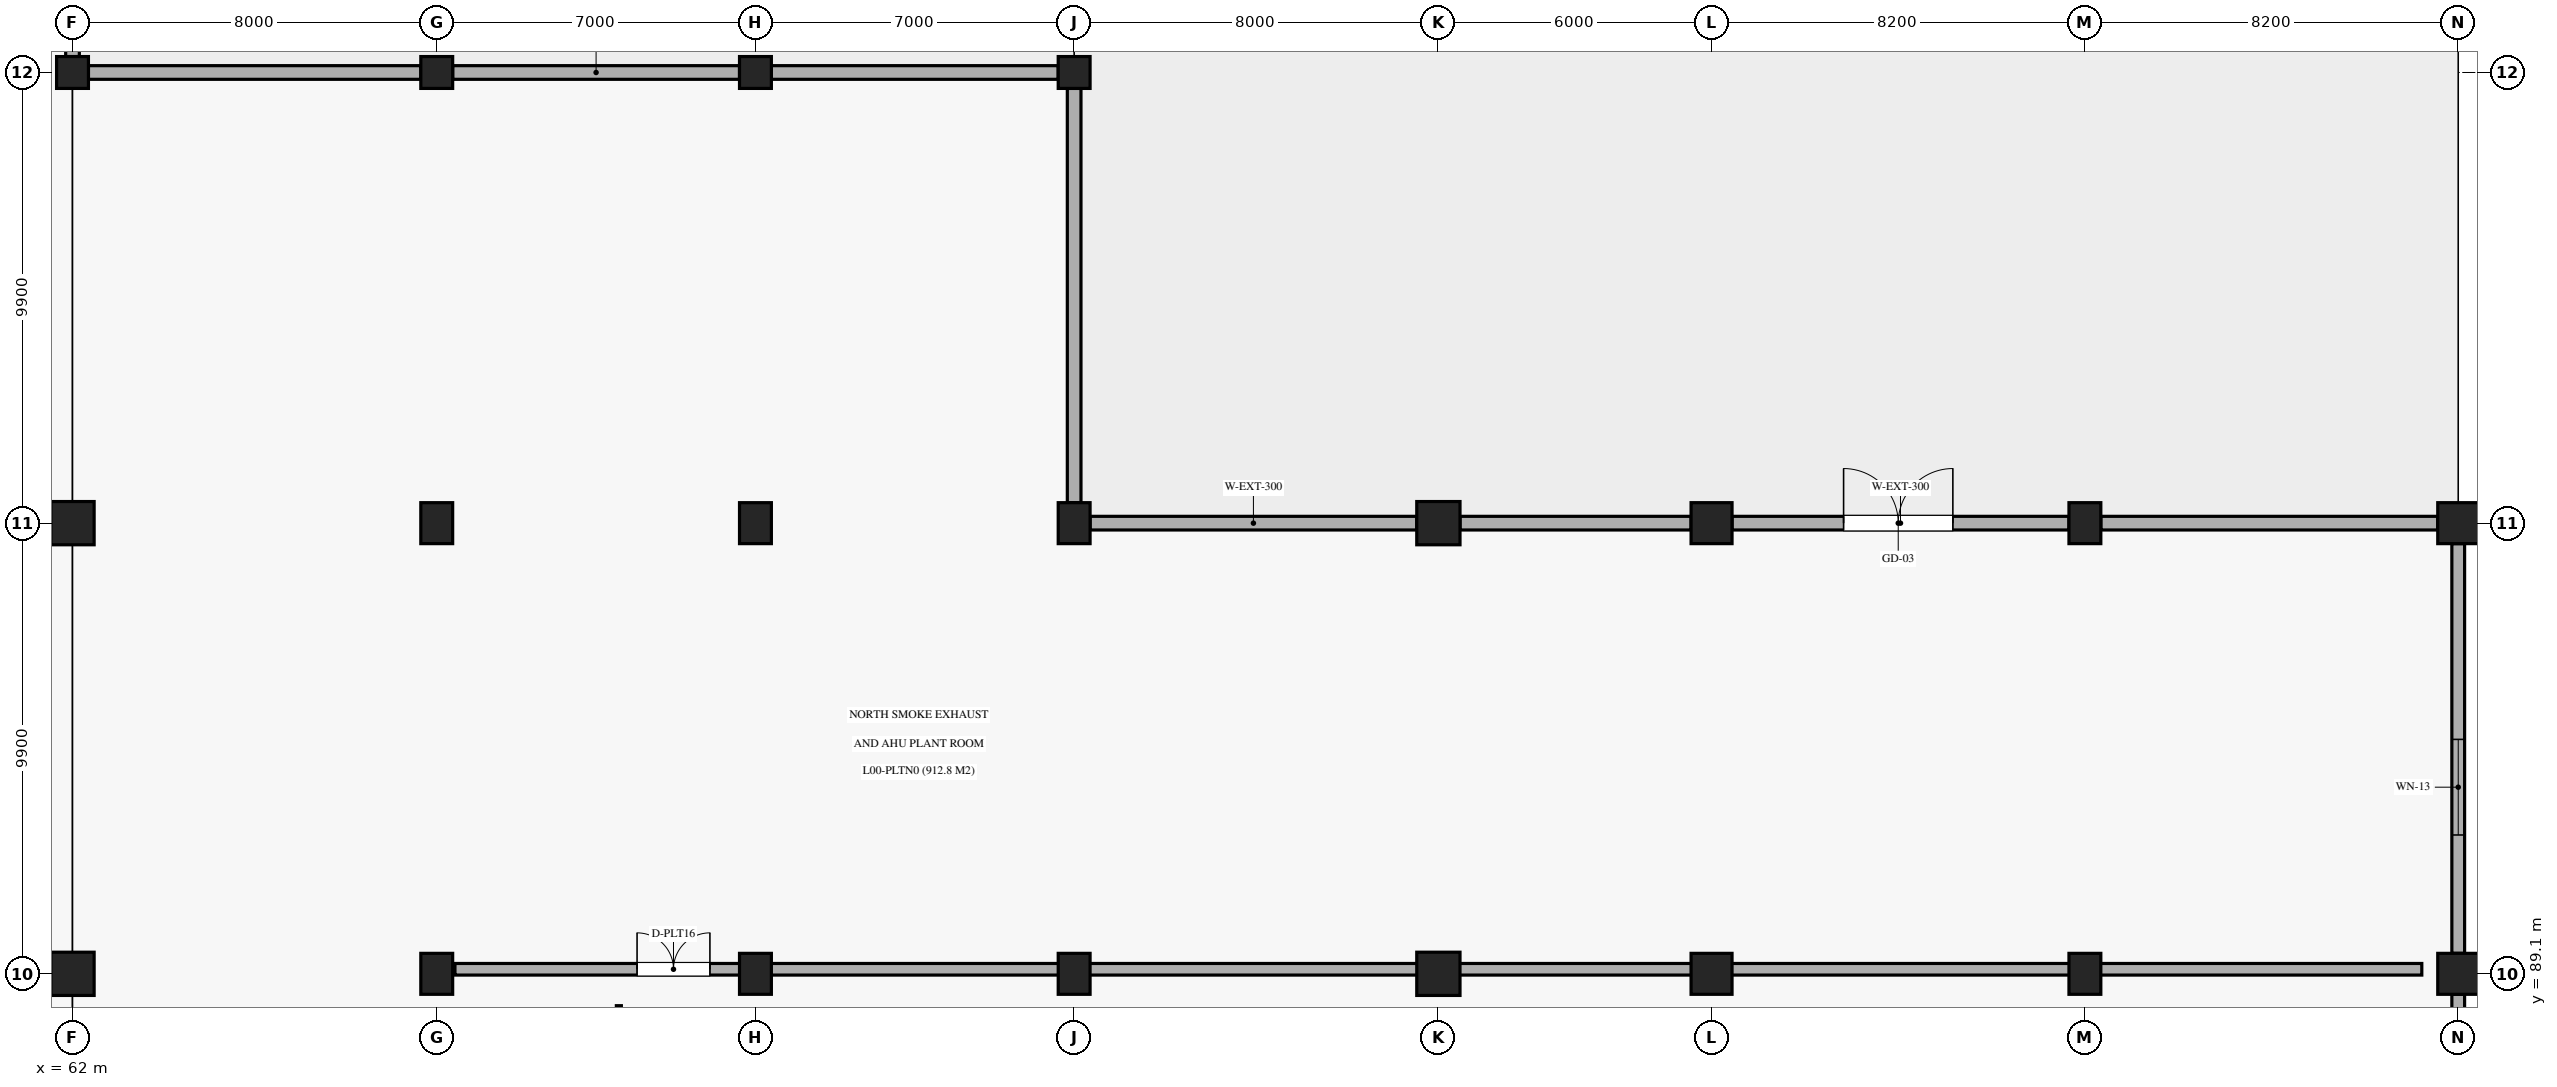
"""IFC4 building model, lengths in metres.
Left out: names, types, materials, properties, quantities, classifications, styles, units other than length and angle.
Written with IfcOpenShell. Run it as: python <this file> out.ifc"""

import sys

from ifc_helpers import new_model, si_unit, direction, frame, frame_2d, origin, origin_2d, place, context, subcontext, project, spatial, rectangle, extrude, element, fill, save


model = new_model("IFC4")
c1 = context("Model", 3, precision=1e-05, world=origin(), true_north=direction((0.0, 1.0)))
c2 = subcontext(c1, "Body", "Model", "MODEL_VIEW")
j1 = project(units=[si_unit("LENGTHUNIT", "METRE"), si_unit("PLANEANGLEUNIT", "RADIAN")], contexts=[c1])
p1 = place(None, origin())
s1 = spatial("IfcSite", under=j1, at=p1, CompositionType="ELEMENT")
p2 = place(p1, origin())
s2 = spatial("IfcBuilding", under=s1, at=p2, CompositionType="ELEMENT")
p3 = place(p2, origin())
s3 = spatial("IfcBuildingStorey", under=s2, at=p3, CompositionType="ELEMENT", Elevation=0.0)
for number, where, z_axis, x_axis in (
    (1, (62.0, 89.1, 0.0), (0.0, 0.0, 1.0), (1.0, 0.0, 0.0)),
    (2, (62.0, 99.0, 0.0), (0.0, 0.0, 1.0), (1.0, 0.0, 0.0)),
):
    element("IfcColumn", number, at=place(p3, frame(where, z_axis=z_axis, x_axis=x_axis)), inside=s3, PredefinedType="COLUMN", context=c2, shape_type="SweptSolid", body=[
        extrude(rectangle(XDim=0.95, YDim=0.95, at=origin_2d()), origin(), (0.0, 0.0, 1.0), 5.44),
    ])
p4 = place(p3, frame((62.0, 108.9, 0.0), z_axis=(0.0, 0.0, 1.0), x_axis=(1.0, 0.0, 0.0)))
e3 = element("IfcColumn", 3, at=p4, inside=s3, PredefinedType="COLUMN", context=c2, shape_type="SweptSolid", body=[
    extrude(rectangle(XDim=0.7, YDim=0.7, at=origin_2d()), origin(), (0.0, 0.0, 1.0), 5.44),
])
for number, where, z_axis, x_axis in (
    (4, (70.0, 89.1, 0.0), (0.0, 0.0, 1.0), (1.0, 0.0, 0.0)),
    (5, (70.0, 99.0, 0.0), (0.0, 0.0, 1.0), (1.0, 0.0, 0.0)),
):
    element("IfcColumn", number, at=place(p3, frame(where, z_axis=z_axis, x_axis=x_axis)), inside=s3, PredefinedType="COLUMN", context=c2, shape_type="SweptSolid", body=[
        extrude(rectangle(XDim=0.7, YDim=0.9, at=origin_2d()), origin(), (0.0, 0.0, 1.0), 5.44),
    ])
p5 = place(p3, frame((70.0, 108.9, 0.0), z_axis=(0.0, 0.0, 1.0), x_axis=(1.0, 0.0, 0.0)))
e6 = element("IfcColumn", 6, at=p5, inside=s3, PredefinedType="COLUMN", context=c2, shape_type="SweptSolid", body=[
    extrude(rectangle(XDim=0.7, YDim=0.7, at=origin_2d()), origin(), (0.0, 0.0, 1.0), 5.44),
])
for number, where, z_axis, x_axis in (
    (7, (77.0, 89.1, 0.0), (0.0, 0.0, 1.0), (1.0, 0.0, 0.0)),
    (8, (77.0, 99.0, 0.0), (0.0, 0.0, 1.0), (1.0, 0.0, 0.0)),
):
    element("IfcColumn", number, at=place(p3, frame(where, z_axis=z_axis, x_axis=x_axis)), inside=s3, PredefinedType="COLUMN", context=c2, shape_type="SweptSolid", body=[
        extrude(rectangle(XDim=0.7, YDim=0.9, at=origin_2d()), origin(), (0.0, 0.0, 1.0), 5.44),
    ])
p6 = place(p3, frame((77.0, 108.9, 0.0), z_axis=(0.0, 0.0, 1.0), x_axis=(1.0, 0.0, 0.0)))
e9 = element("IfcColumn", 9, at=p6, inside=s3, PredefinedType="COLUMN", context=c2, shape_type="SweptSolid", body=[
    extrude(rectangle(XDim=0.7, YDim=0.7, at=origin_2d()), origin(), (0.0, 0.0, 1.0), 5.44),
])
for number, where, z_axis, x_axis in (
    (10, (84.0, 89.1, 0.0), (0.0, 0.0, 1.0), (1.0, 0.0, 0.0)),
    (11, (84.0, 99.0, 0.0), (0.0, 0.0, 1.0), (1.0, 0.0, 0.0)),
):
    element("IfcColumn", number, at=place(p3, frame(where, z_axis=z_axis, x_axis=x_axis)), inside=s3, PredefinedType="COLUMN", context=c2, shape_type="SweptSolid", body=[
        extrude(rectangle(XDim=0.7, YDim=0.9, at=origin_2d()), origin(), (0.0, 0.0, 1.0), 5.44),
    ])
p7 = place(p3, frame((84.0, 108.9, 0.0), z_axis=(0.0, 0.0, 1.0), x_axis=(1.0, 0.0, 0.0)))
e12 = element("IfcColumn", 12, at=p7, inside=s3, PredefinedType="COLUMN", context=c2, shape_type="SweptSolid", body=[
    extrude(rectangle(XDim=0.7, YDim=0.7, at=origin_2d()), origin(), (0.0, 0.0, 1.0), 5.44),
])
for number, where, z_axis, x_axis in (
    (13, (92.0, 89.1, 0.0), (0.0, 0.0, 1.0), (1.0, 0.0, 0.0)),
    (14, (92.0, 99.0, 0.0), (0.0, 0.0, 1.0), (1.0, 0.0, 0.0)),
):
    element("IfcColumn", number, at=place(p3, frame(where, z_axis=z_axis, x_axis=x_axis)), inside=s3, PredefinedType="COLUMN", context=c2, shape_type="SweptSolid", body=[
        extrude(rectangle(XDim=0.95, YDim=0.95, at=origin_2d()), origin(), (0.0, 0.0, 1.0), 5.44),
    ])
for number, where, z_axis, x_axis in (
    (15, (98.0, 89.1, 0.0), (0.0, 0.0, 1.0), (1.0, 0.0, 0.0)),
    (16, (98.0, 99.0, 0.0), (0.0, 0.0, 1.0), (1.0, 0.0, 0.0)),
):
    element("IfcColumn", number, at=place(p3, frame(where, z_axis=z_axis, x_axis=x_axis)), inside=s3, PredefinedType="COLUMN", context=c2, shape_type="SweptSolid", body=[
        extrude(rectangle(XDim=0.9, YDim=0.9, at=origin_2d()), origin(), (0.0, 0.0, 1.0), 5.44),
    ])
for number, where, z_axis, x_axis in (
    (17, (106.2, 89.1, 0.0), (0.0, 0.0, 1.0), (1.0, 0.0, 0.0)),
    (18, (106.2, 99.0, 0.0), (0.0, 0.0, 1.0), (1.0, 0.0, 0.0)),
):
    element("IfcColumn", number, at=place(p3, frame(where, z_axis=z_axis, x_axis=x_axis)), inside=s3, PredefinedType="COLUMN", context=c2, shape_type="SweptSolid", body=[
        extrude(rectangle(XDim=0.7, YDim=0.9, at=origin_2d()), origin(), (0.0, 0.0, 1.0), 5.44),
    ])
for number, where, z_axis, x_axis in (
    (19, (114.4, 89.1, 0.0), (0.0, 0.0, 1.0), (1.0, 0.0, 0.0)),
    (20, (114.4, 99.0, 0.0), (0.0, 0.0, 1.0), (1.0, 0.0, 0.0)),
):
    element("IfcColumn", number, at=place(p3, frame(where, z_axis=z_axis, x_axis=x_axis)), inside=s3, PredefinedType="COLUMN", context=c2, shape_type="SweptSolid", body=[
        extrude(rectangle(XDim=0.9, YDim=0.9, at=origin_2d()), origin(), (0.0, 0.0, 1.0), 5.44),
    ])
p8 = place(p3, frame((114.4, 79.65, 0.0), z_axis=(0.0, 0.0, 1.0), x_axis=(0.0, 1.0, 0.0)))
e21 = element("IfcWall", 21, at=p8, inside=s3, PredefinedType="SOLIDWALL", context=c2, shape_type="SweptSolid", body=[
    extrude(rectangle(XDim=9.0, YDim=0.28, at=frame_2d((4.5, 0.0))), origin(), (0.0, 0.0, 1.0), 4.4),
])
p9 = place(p8, frame((2.6, 0.0, 1.05)))
e22 = element("IfcOpeningElement", 22, at=p9, cuts=e21, PredefinedType="OPENING", context=c2, shape_type="SweptSolid", body=[
    extrude(rectangle(XDim=2.3, YDim=1.55, at=frame_2d((1.15, 0.775))), frame((0.0, 0.15, 0.0), z_axis=(0.0, -1.0, 0.0), x_axis=(1.0, 0.0, 0.0)), (0.0, 0.0, 1.0), 0.3),
])
p10 = place(p3, frame((114.4, 89.55, 0.0), z_axis=(0.0, 0.0, 1.0), x_axis=(0.0, 1.0, 0.0)))
e23 = element("IfcWall", 23, at=p10, inside=s3, PredefinedType="SOLIDWALL", context=c2, shape_type="SweptSolid", body=[
    extrude(rectangle(XDim=9.0, YDim=0.28, at=frame_2d((4.5, 0.0))), origin(), (0.0, 0.0, 1.0), 4.4),
])
p11 = place(p10, frame((2.6, 0.0, 1.05)))
e24 = element("IfcOpeningElement", 24, at=p11, cuts=e23, PredefinedType="OPENING", context=c2, shape_type="SweptSolid", body=[
    extrude(rectangle(XDim=2.1, YDim=1.5, at=frame_2d((1.05, 0.75))), frame((0.0, 0.15, 0.0), z_axis=(0.0, -1.0, 0.0), x_axis=(1.0, 0.0, 0.0)), (0.0, 0.0, 1.0), 0.3),
])
p12 = place(p3, frame((84.35, 99.0, 0.0), z_axis=(0.0, 0.0, 1.0), x_axis=(1.0, 0.0, 0.0)))
e25 = element("IfcWall", 25, at=p12, inside=s3, PredefinedType="SOLIDWALL", context=c2, shape_type="SweptSolid", body=[
    extrude(rectangle(XDim=7.175, YDim=0.3, at=frame_2d((3.587, 0.0))), origin(), (0.0, 0.0, 1.0), 4.4),
])
p13 = place(p3, frame((92.475, 99.0, 0.0), z_axis=(0.0, 0.0, 1.0), x_axis=(1.0, 0.0, 0.0)))
e26 = element("IfcWall", 26, at=p13, inside=s3, PredefinedType="SOLIDWALL", context=c2, shape_type="SweptSolid", body=[
    extrude(rectangle(XDim=5.075, YDim=0.3, at=frame_2d((2.538, 0.0))), origin(), (0.0, 0.0, 1.0), 4.4),
])
p14 = place(p3, frame((98.45, 99.0, 0.0), z_axis=(0.0, 0.0, 1.0), x_axis=(1.0, 0.0, 0.0)))
e27 = element("IfcWall", 27, at=p14, inside=s3, PredefinedType="SOLIDWALL", context=c2, shape_type="SweptSolid", body=[
    extrude(rectangle(XDim=7.4, YDim=0.3, at=frame_2d((3.7, 0.0))), origin(), (0.0, 0.0, 1.0), 4.4),
])
p15 = place(p14, frame((2.45, 0.0, 0.0)))
e28 = element("IfcOpeningElement", 28, at=p15, cuts=e27, PredefinedType="OPENING", context=c2, shape_type="SweptSolid", body=[
    extrude(rectangle(XDim=2.4, YDim=2.4, at=frame_2d((1.2, 1.2))), frame((0.0, 0.16, 0.0), z_axis=(0.0, -1.0, 0.0), x_axis=(1.0, 0.0, 0.0)), (0.0, 0.0, 1.0), 0.32),
])
p16 = place(p3, frame((106.55, 99.0, 0.0), z_axis=(0.0, 0.0, 1.0), x_axis=(1.0, 0.0, 0.0)))
e29 = element("IfcWall", 29, at=p16, inside=s3, PredefinedType="SOLIDWALL", context=c2, shape_type="SweptSolid", body=[
    extrude(rectangle(XDim=7.4, YDim=0.3, at=frame_2d((3.7, 0.0))), origin(), (0.0, 0.0, 1.0), 4.4),
])
p17 = place(p3, frame((84.0, 99.45, 0.0), z_axis=(0.0, 0.0, 1.0), x_axis=(0.0, 1.0, 0.0)))
e30 = element("IfcWall", 30, at=p17, inside=s3, PredefinedType="SOLIDWALL", context=c2, shape_type="SweptSolid", body=[
    extrude(rectangle(XDim=9.1, YDim=0.3, at=frame_2d((4.55, 0.0))), origin(), (0.0, 0.0, 1.0), 4.4),
])
p18 = place(p3, frame((62.35, 108.9, 0.0), z_axis=(0.0, 0.0, 1.0), x_axis=(1.0, 0.0, 0.0)))
e31 = element("IfcWall", 31, at=p18, inside=s3, PredefinedType="SOLIDWALL", context=c2, shape_type="SweptSolid", body=[
    extrude(rectangle(XDim=7.3, YDim=0.3, at=frame_2d((3.65, 0.0))), origin(), (0.0, 0.0, 1.0), 4.4),
])
for number, where, z_axis, x_axis in (
    (32, (70.35, 108.9, 0.0), (0.0, 0.0, 1.0), (1.0, 0.0, 0.0)),
    (33, (77.35, 108.9, 0.0), (0.0, 0.0, 1.0), (1.0, 0.0, 0.0)),
):
    element("IfcWall", number, at=place(p3, frame(where, z_axis=z_axis, x_axis=x_axis)), inside=s3, PredefinedType="SOLIDWALL", context=c2, shape_type="SweptSolid", body=[
        extrude(rectangle(XDim=6.3, YDim=0.3, at=frame_2d((3.15, 0.0))), origin(), (0.0, 0.0, 1.0), 4.4),
    ])
p19 = place(p3, frame((62.0, 109.25, 0.0), z_axis=(0.0, 0.0, 1.0), x_axis=(0.0, 1.0, 0.0)))
e34 = element("IfcWall", 34, at=p19, inside=s3, PredefinedType="SOLIDWALL", context=c2, shape_type="SweptSolid", body=[
    extrude(rectangle(XDim=9.2, YDim=0.3, at=frame_2d((4.6, 0.0))), origin(), (0.0, 0.0, 1.0), 4.4),
])
p20 = place(p3, frame((74.0, 69.5, 0.0), z_axis=(0.0, 0.0, 1.0), x_axis=(0.0, 1.0, 0.0)))
e35 = element("IfcWall", 35, at=p20, inside=s3, PredefinedType="PARTITIONING", context=c2, shape_type="SweptSolid", body=[
    extrude(rectangle(XDim=18.9, YDim=0.11, at=frame_2d((9.45, 0.0))), origin(), (0.0, 0.0, 1.0), 4.3),
])
p21 = place(p20, frame((8.0, 0.0, 0.0)))
e36 = element("IfcOpeningElement", 36, at=p21, cuts=e35, PredefinedType="OPENING", context=c2, shape_type="SweptSolid", body=[
    extrude(rectangle(XDim=2.0, YDim=2.5, at=frame_2d((1.0, 1.25))), frame((0.0, 0.065, 0.0), z_axis=(0.0, -1.0, 0.0), x_axis=(1.0, 0.0, 0.0)), (0.0, 0.0, 1.0), 0.13),
])
p22 = place(p3, frame((70.4, 89.2, 0.0), z_axis=(0.0, 0.0, 1.0), x_axis=(1.0, 0.0, 0.0)))
e37 = element("IfcWall", 37, at=p22, inside=s3, PredefinedType="SOLIDWALL", context=c2, shape_type="SweptSolid", body=[
    extrude(rectangle(XDim=43.2, YDim=0.255, at=frame_2d((21.6, 0.0))), origin(), (0.0, 0.0, 1.0), 4.3),
])
p23 = place(p22, frame((4.0, 0.0, 0.0)))
e38 = element("IfcOpeningElement", 38, at=p23, cuts=e37, PredefinedType="OPENING", context=c2, shape_type="SweptSolid", body=[
    extrude(rectangle(XDim=1.6, YDim=2.25, at=frame_2d((0.8, 1.125))), frame((0.0, 0.137, 0.0), z_axis=(0.0, -1.0, 0.0), x_axis=(1.0, 0.0, 0.0)), (0.0, 0.0, 1.0), 0.275),
])
p24 = place(p11, origin())
e39 = element("IfcWindow", 39, at=p24, inside=s3, PartitioningType="SINGLE_PANEL", PredefinedType="WINDOW", context=c2, shape_type="SweptSolid", body=[
    extrude(rectangle(XDim=2.1, YDim=1.5, at=frame_2d((1.05, 0.75))), frame((0.0, 0.03, 0.0), z_axis=(0.0, -1.0, 0.0), x_axis=(1.0, 0.0, 0.0)), (0.0, 0.0, 1.0), 0.06),
])
fill(e24, e39)
p25 = place(p15, origin())
e40 = element("IfcDoor", 40, at=p25, inside=s3, OperationType="DOUBLE_DOOR_SINGLE_SWING", PredefinedType="GATE", context=c2, shape_type="SweptSolid", body=[
    extrude(rectangle(XDim=2.4, YDim=2.4, at=frame_2d((1.2, 1.2))), frame((0.0, 0.025, 0.0), z_axis=(0.0, -1.0, 0.0), x_axis=(1.0, 0.0, 0.0)), (0.0, 0.0, 1.0), 0.05),
])
fill(e28, e40)
p26 = place(p23, origin())
e41 = element("IfcDoor", 41, at=p26, inside=s3, OperationType="DOUBLE_DOOR_SINGLE_SWING", PredefinedType="DOOR", context=c2, shape_type="SweptSolid", body=[
    extrude(rectangle(XDim=1.6, YDim=2.25, at=frame_2d((0.8, 1.125))), frame((0.0, 0.025, 0.0), z_axis=(0.0, -1.0, 0.0), x_axis=(1.0, 0.0, 0.0)), (0.0, 0.0, 1.0), 0.05),
])
fill(e38, e41)
save(model, sys.argv[1])
